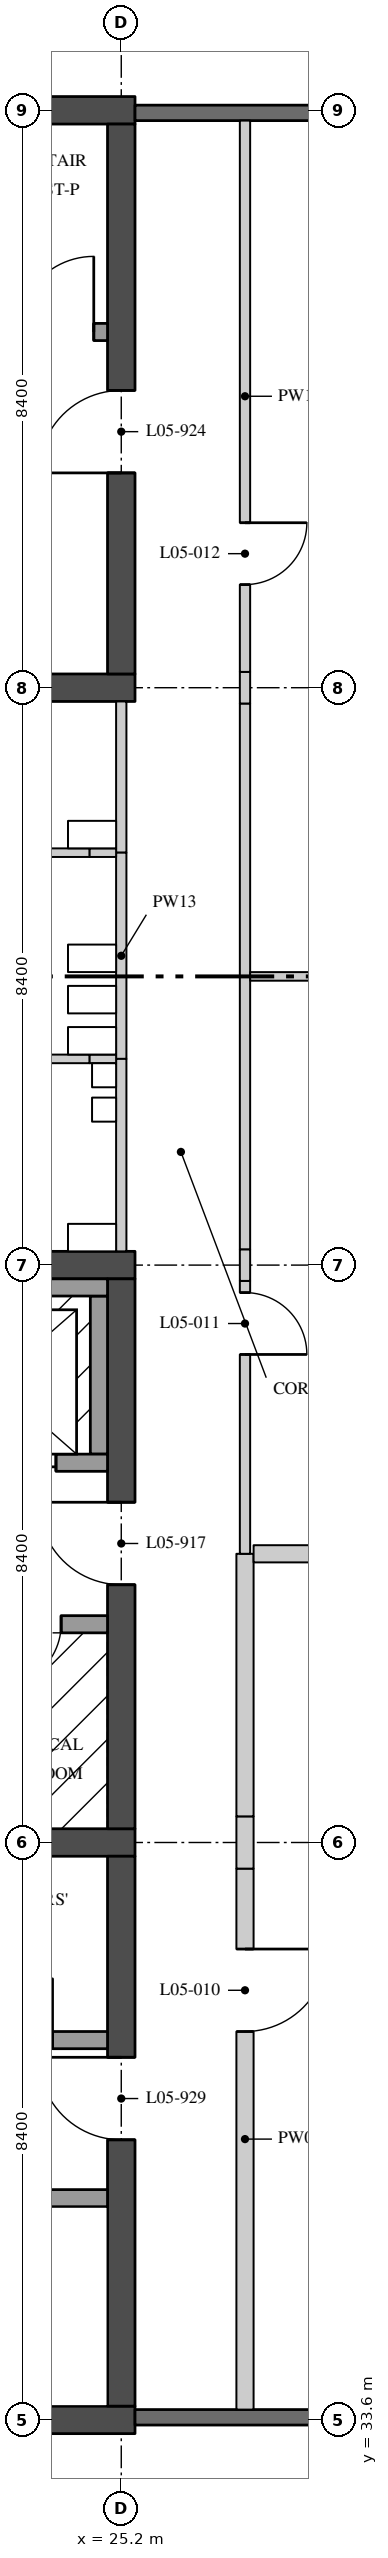
"""IFC4 building model, lengths in metres.
Left out: names, types, materials, properties, quantities, classifications, styles, units other than length and angle.
Written with IfcOpenShell. Run it as: python <this file> out.ifc"""

import sys

from ifc_helpers import new_model, si_unit, direction, frame, frame_2d, origin, place, context, subcontext, project, spatial, rectangle, extrude, element, fill, save


model = new_model("IFC4")
c1 = context("Model", 3, precision=1e-05, world=origin(), true_north=direction((0.0, 1.0)))
c2 = subcontext(c1, "Body", "Model", "MODEL_VIEW")
j1 = project(units=[si_unit("LENGTHUNIT", "METRE"), si_unit("PLANEANGLEUNIT", "RADIAN")], contexts=[c1])
p1 = place(None, origin())
s1 = spatial("IfcSite", under=j1, at=p1, CompositionType="ELEMENT")
p2 = place(p1, origin())
s2 = spatial("IfcBuilding", under=s1, at=p2, CompositionType="ELEMENT")
p3 = place(p2, frame((0.0, 0.0, 23.4)))
s3 = spatial("IfcBuildingStorey", under=s2, at=p3, CompositionType="ELEMENT", Elevation=23.4)
p4 = place(p3, frame((16.6, 42.0, 0.0), z_axis=(0.0, 0.0, 1.0), x_axis=(1.0, 0.0, 0.0)))
e1 = element("IfcWall", 1, at=p4, inside=s3, PredefinedType="SHEAR", context=c2, shape_type="SweptSolid", body=[
    extrude(rectangle(XDim=8.8, YDim=0.4, at=frame_2d((4.4, 0.0))), origin(), (0.0, 0.0, 1.0), 4.37),
])
p5 = place(p4, frame((1.05, 0.0, 0.0)))
e2 = element("IfcOpeningElement", 2, at=p5, cuts=e1, PredefinedType="OPENING", context=c2, shape_type="SweptSolid", body=[
    extrude(rectangle(XDim=1.1, YDim=2.1, at=frame_2d((0.55, 1.05))), frame((0.0, 0.21, 0.0), z_axis=(0.0, -1.0, 0.0), x_axis=(1.0, 0.0, 0.0)), (0.0, 0.0, 1.0), 0.42),
])
p6 = place(p3, frame((16.6, 50.4, 0.0), z_axis=(0.0, 0.0, 1.0), x_axis=(1.0, 0.0, 0.0)))
e3 = element("IfcWall", 3, at=p6, inside=s3, PredefinedType="SHEAR", context=c2, shape_type="SweptSolid", body=[
    extrude(rectangle(XDim=8.8, YDim=0.4, at=frame_2d((4.4, 0.0))), origin(), (0.0, 0.0, 1.0), 4.37),
])
p7 = place(p3, frame((25.2, 42.2, 0.0), z_axis=(0.0, 0.0, 1.0), x_axis=(0.0, 1.0, 0.0)))
e4 = element("IfcWall", 4, at=p7, inside=s3, PredefinedType="SHEAR", context=c2, shape_type="SweptSolid", body=[
    extrude(rectangle(XDim=8.0, YDim=0.4, at=frame_2d((4.0, 0.0))), origin(), (0.0, 0.0, 1.0), 4.37),
])
p8 = place(p7, frame((3.55, 0.0, 0.0)))
e5 = element("IfcOpeningElement", 5, at=p8, cuts=e4, PredefinedType="OPENING", context=c2, shape_type="SweptSolid", body=[
    extrude(rectangle(XDim=1.2, YDim=2.1, at=frame_2d((0.6, 1.05))), frame((0.0, 0.21, 0.0), z_axis=(0.0, -1.0, 0.0), x_axis=(1.0, 0.0, 0.0)), (0.0, 0.0, 1.0), 0.42),
])
p9 = place(p3, frame((25.0, 45.175, 0.0), z_axis=(0.0, 0.0, 1.0), x_axis=(-1.0, 0.0, 0.0)))
e6 = element("IfcWall", 6, at=p9, inside=s3, PredefinedType="SOLIDWALL", context=c2, shape_type="SweptSolid", body=[
    extrude(rectangle(XDim=2.25, YDim=0.25, at=frame_2d((1.125, 0.0))), origin(), (0.0, 0.0, 1.0), 4.37),
])
p10 = place(p9, frame((0.675, 0.0, 0.0)))
e7 = element("IfcOpeningElement", 7, at=p10, cuts=e6, PredefinedType="OPENING", context=c2, shape_type="SweptSolid", body=[
    extrude(rectangle(XDim=0.9, YDim=2.1, at=frame_2d((0.45, 1.05))), frame((0.0, 0.135, 0.0), z_axis=(0.0, -1.0, 0.0), x_axis=(1.0, 0.0, 0.0)), (0.0, 0.0, 1.0), 0.27),
])
for number, where, z_axis, x_axis in (
    (8, (16.6, 58.8, 0.0), (0.0, 0.0, 1.0), (1.0, 0.0, 0.0)),
    (9, (16.6, 67.2, 0.0), (0.0, 0.0, 1.0), (1.0, 0.0, 0.0)),
):
    element("IfcWall", number, at=place(p3, frame(where, z_axis=z_axis, x_axis=x_axis)), inside=s3, PredefinedType="SHEAR", context=c2, shape_type="SweptSolid", body=[
        extrude(rectangle(XDim=8.8, YDim=0.4, at=frame_2d((4.4, 0.0))), origin(), (0.0, 0.0, 1.0), 4.37),
    ])
p11 = place(p3, frame((25.2, 59.0, 0.0), z_axis=(0.0, 0.0, 1.0), x_axis=(0.0, 1.0, 0.0)))
e10 = element("IfcWall", 10, at=p11, inside=s3, PredefinedType="SHEAR", context=c2, shape_type="SweptSolid", body=[
    extrude(rectangle(XDim=8.0, YDim=0.4, at=frame_2d((4.0, 0.0))), origin(), (0.0, 0.0, 1.0), 4.37),
])
p12 = place(p11, frame((2.925, 0.0, 0.0)))
e11 = element("IfcOpeningElement", 11, at=p12, cuts=e10, PredefinedType="OPENING", context=c2, shape_type="SweptSolid", body=[
    extrude(rectangle(XDim=1.2, YDim=2.1, at=frame_2d((0.6, 1.05))), frame((0.0, 0.21, 0.0), z_axis=(0.0, -1.0, 0.0), x_axis=(1.0, 0.0, 0.0)), (0.0, 0.0, 1.0), 0.42),
])
p13 = place(p3, frame((25.0, 63.975, 0.0), z_axis=(0.0, 0.0, 1.0), x_axis=(-1.0, 0.0, 0.0)))
e12 = element("IfcWall", 12, at=p13, inside=s3, PredefinedType="SOLIDWALL", context=c2, shape_type="SweptSolid", body=[
    extrude(rectangle(XDim=8.0, YDim=0.25, at=frame_2d((4.0, 0.0))), origin(), (0.0, 0.0, 1.0), 4.37),
])
p14 = place(p13, frame((0.2, 0.0, 0.0)))
e13 = element("IfcOpeningElement", 13, at=p14, cuts=e12, PredefinedType="OPENING", context=c2, shape_type="SweptSolid", body=[
    extrude(rectangle(XDim=1.1, YDim=2.1, at=frame_2d((0.55, 1.05))), frame((0.0, 0.135, 0.0), z_axis=(0.0, -1.0, 0.0), x_axis=(1.0, 0.0, 0.0)), (0.0, 0.0, 1.0), 0.27),
])
p15 = place(p3, frame((16.6, 33.6, 0.0), z_axis=(0.0, 0.0, 1.0), x_axis=(1.0, 0.0, 0.0)))
e14 = element("IfcWall", 14, at=p15, inside=s3, PredefinedType="SHEAR", context=c2, shape_type="SweptSolid", body=[
    extrude(rectangle(XDim=8.8, YDim=0.4, at=frame_2d((4.4, 0.0))), origin(), (0.0, 0.0, 1.0), 4.37),
])
p16 = place(p3, frame((25.2, 33.8, 0.0), z_axis=(0.0, 0.0, 1.0), x_axis=(0.0, 1.0, 0.0)))
e15 = element("IfcWall", 15, at=p16, inside=s3, PredefinedType="SHEAR", context=c2, shape_type="SweptSolid", body=[
    extrude(rectangle(XDim=8.0, YDim=0.4, at=frame_2d((4.0, 0.0))), origin(), (0.0, 0.0, 1.0), 4.37),
])
p17 = place(p16, frame((3.875, 0.0, 0.0)))
e16 = element("IfcOpeningElement", 16, at=p17, cuts=e15, PredefinedType="OPENING", context=c2, shape_type="SweptSolid", body=[
    extrude(rectangle(XDim=1.2, YDim=2.1, at=frame_2d((0.6, 1.05))), frame((0.0, 0.21, 0.0), z_axis=(0.0, -1.0, 0.0), x_axis=(1.0, 0.0, 0.0)), (0.0, 0.0, 1.0), 0.42),
])
p18 = place(p3, frame((17.0, 36.825, 0.0), z_axis=(0.0, 0.0, 1.0), x_axis=(1.0, 0.0, 0.0)))
e17 = element("IfcWall", 17, at=p18, inside=s3, PredefinedType="SOLIDWALL", context=c2, shape_type="SweptSolid", body=[
    extrude(rectangle(XDim=8.0, YDim=0.25, at=frame_2d((4.0, 0.0))), origin(), (0.0, 0.0, 1.0), 4.37),
])
p19 = place(p18, frame((0.2, 0.0, 0.0)))
e18 = element("IfcOpeningElement", 18, at=p19, cuts=e17, PredefinedType="OPENING", context=c2, shape_type="SweptSolid", body=[
    extrude(rectangle(XDim=1.1, YDim=2.1, at=frame_2d((0.55, 1.05))), frame((0.0, 0.135, 0.0), z_axis=(0.0, -1.0, 0.0), x_axis=(1.0, 0.0, 0.0)), (0.0, 0.0, 1.0), 0.27),
])
p20 = place(p3, frame((19.65, 39.125, 0.0), z_axis=(0.0, 0.0, 1.0), x_axis=(1.0, 0.0, 0.0)))
e19 = element("IfcWall", 19, at=p20, inside=s3, PredefinedType="SOLIDWALL", context=c2, shape_type="SweptSolid", body=[
    extrude(rectangle(XDim=5.35, YDim=0.25, at=frame_2d((2.675, 0.0))), origin(), (0.0, 0.0, 1.0), 4.37),
])
p21 = place(p20, frame((3.65, 0.0, 0.0)))
e20 = element("IfcOpeningElement", 20, at=p21, cuts=e19, PredefinedType="OPENING", context=c2, shape_type="SweptSolid", body=[
    extrude(rectangle(XDim=0.9, YDim=2.1, at=frame_2d((0.45, 1.05))), frame((0.0, 0.135, 0.0), z_axis=(0.0, -1.0, 0.0), x_axis=(1.0, 0.0, 0.0)), (0.0, 0.0, 1.0), 0.27),
])
p22 = place(p20, frame((0.9, 0.0, 0.0)))
e21 = element("IfcOpeningElement", 21, at=p22, cuts=e19, PredefinedType="OPENING", context=c2, shape_type="SweptSolid", body=[
    extrude(rectangle(XDim=0.8, YDim=2.1, at=frame_2d((0.4, 1.05))), frame((0.0, 0.135, 0.0), z_axis=(0.0, -1.0, 0.0), x_axis=(1.0, 0.0, 0.0)), (0.0, 0.0, 1.0), 0.27),
])
p23 = place(p3, frame((24.875, 47.65, 0.0), z_axis=(0.0, 0.0, 1.0), x_axis=(0.0, 1.0, 0.0)))
e22 = element("IfcWall", 22, at=p23, inside=s3, PredefinedType="SOLIDWALL", context=c2, shape_type="SweptSolid", body=[
    extrude(rectangle(XDim=2.3, YDim=0.25, at=frame_2d((1.15, 0.0))), origin(), (0.0, 0.0, 1.0), 4.37),
])
p24 = place(p3, frame((21.7, 50.075, 0.0), z_axis=(0.0, 0.0, 1.0), x_axis=(1.0, 0.0, 0.0)))
e23 = element("IfcWall", 23, at=p24, inside=s3, PredefinedType="SOLIDWALL", context=c2, shape_type="SweptSolid", body=[
    extrude(rectangle(XDim=3.3, YDim=0.25, at=frame_2d((1.65, 0.0))), origin(), (0.0, 0.0, 1.0), 4.37),
])
p25 = place(p3, frame((21.7, 47.525, 0.0), z_axis=(0.0, 0.0, 1.0), x_axis=(1.0, 0.0, 0.0)))
e24 = element("IfcWall", 24, at=p25, inside=s3, PredefinedType="SOLIDWALL", context=c2, shape_type="SweptSolid", body=[
    extrude(rectangle(XDim=3.3, YDim=0.25, at=frame_2d((1.65, 0.0))), origin(), (0.0, 0.0, 1.0), 4.37),
])
p26 = place(p25, frame((0.75, 0.0, 0.0)))
e25 = element("IfcOpeningElement", 25, at=p26, cuts=e24, PredefinedType="OPENING", context=c2, shape_type="SweptSolid", body=[
    extrude(rectangle(XDim=1.8, YDim=2.1, at=frame_2d((0.9, 1.05))), frame((0.0, 0.135, 0.0), z_axis=(0.0, -1.0, 0.0), x_axis=(1.0, 0.0, 0.0)), (0.0, 0.0, 1.0), 0.27),
])
p27 = place(p3, frame((27.0, 33.75, 0.0), z_axis=(0.0, 0.0, 1.0), x_axis=(0.0, 1.0, 0.0)))
e26 = element("IfcWall", 26, at=p27, inside=s3, PredefinedType="PARTITIONING", context=c2, shape_type="SweptSolid", body=[
    extrude(rectangle(XDim=7.87, YDim=0.25, at=frame_2d((3.935, 0.0))), origin(), (0.0, 0.0, 1.0), 4.37),
])
p28 = place(p27, frame((5.5, 0.0, 0.0)))
e27 = element("IfcOpeningElement", 27, at=p28, cuts=e26, PredefinedType="OPENING", context=c2, shape_type="SweptSolid", body=[
    extrude(rectangle(XDim=1.2, YDim=2.4, at=frame_2d((0.6, 1.2))), frame((0.0, 0.135, 0.0), z_axis=(0.0, -1.0, 0.0), x_axis=(1.0, 0.0, 0.0)), (0.0, 0.0, 1.0), 0.27),
])
p29 = place(p3, frame((27.0, 41.62, 0.0), z_axis=(0.0, 0.0, 1.0), x_axis=(0.0, 1.0, 0.0)))
e28 = element("IfcWall", 28, at=p29, inside=s3, PredefinedType="PARTITIONING", context=c2, shape_type="SweptSolid", body=[
    extrude(rectangle(XDim=0.76, YDim=0.25, at=frame_2d((0.38, 0.0))), origin(), (0.0, 0.0, 1.0), 3.817),
])
p30 = place(p3, frame((27.0, 42.38, 0.0), z_axis=(0.0, 0.0, 1.0), x_axis=(0.0, 1.0, 0.0)))
e29 = element("IfcWall", 29, at=p30, inside=s3, PredefinedType="PARTITIONING", context=c2, shape_type="SweptSolid", body=[
    extrude(rectangle(XDim=3.82, YDim=0.25, at=frame_2d((1.91, 0.0))), origin(), (0.0, 0.0, 1.0), 4.37),
])
p31 = place(p3, frame((27.0, 46.2, 0.0), z_axis=(0.0, 0.0, 1.0), x_axis=(0.0, 1.0, 0.0)))
e30 = element("IfcWall", 30, at=p31, inside=s3, PredefinedType="PARTITIONING", context=c2, shape_type="SweptSolid", body=[
    extrude(rectangle(XDim=3.97, YDim=0.15, at=frame_2d((1.985, 0.0))), origin(), (0.0, 0.0, 1.0), 4.37),
])
p32 = place(p31, frame((2.9, 0.0, 0.0)))
e31 = element("IfcOpeningElement", 31, at=p32, cuts=e30, PredefinedType="OPENING", context=c2, shape_type="SweptSolid", body=[
    extrude(rectangle(XDim=0.9, YDim=2.1, at=frame_2d((0.45, 1.05))), frame((0.0, 0.085, 0.0), z_axis=(0.0, -1.0, 0.0), x_axis=(1.0, 0.0, 0.0)), (0.0, 0.0, 1.0), 0.17),
])
p33 = place(p3, frame((27.0, 50.17, 0.0), z_axis=(0.0, 0.0, 1.0), x_axis=(0.0, 1.0, 0.0)))
e32 = element("IfcWall", 32, at=p33, inside=s3, PredefinedType="PARTITIONING", context=c2, shape_type="SweptSolid", body=[
    extrude(rectangle(XDim=0.46, YDim=0.15, at=frame_2d((0.23, 0.0))), origin(), (0.0, 0.0, 1.0), 3.817),
])
p34 = place(p3, frame((27.0, 50.63, 0.0), z_axis=(0.0, 0.0, 1.0), x_axis=(0.0, 1.0, 0.0)))
e33 = element("IfcWall", 33, at=p34, inside=s3, PredefinedType="PARTITIONING", context=c2, shape_type="SweptSolid", body=[
    extrude(rectangle(XDim=3.97, YDim=0.15, at=frame_2d((1.985, 0.0))), origin(), (0.0, 0.0, 1.0), 4.37),
])
p35 = place(p3, frame((27.0, 54.6, 0.0), z_axis=(0.0, 0.0, 1.0), x_axis=(0.0, 1.0, 0.0)))
e34 = element("IfcWall", 34, at=p35, inside=s3, PredefinedType="PARTITIONING", context=c2, shape_type="SweptSolid", body=[
    extrude(rectangle(XDim=3.97, YDim=0.15, at=frame_2d((1.985, 0.0))), origin(), (0.0, 0.0, 1.0), 4.37),
])
p36 = place(p3, frame((27.0, 58.57, 0.0), z_axis=(0.0, 0.0, 1.0), x_axis=(0.0, 1.0, 0.0)))
e35 = element("IfcWall", 35, at=p36, inside=s3, PredefinedType="PARTITIONING", context=c2, shape_type="SweptSolid", body=[
    extrude(rectangle(XDim=0.46, YDim=0.15, at=frame_2d((0.23, 0.0))), origin(), (0.0, 0.0, 1.0), 3.817),
])
p37 = place(p3, frame((27.0, 59.03, 0.0), z_axis=(0.0, 0.0, 1.0), x_axis=(0.0, 1.0, 0.0)))
e36 = element("IfcWall", 36, at=p37, inside=s3, PredefinedType="PARTITIONING", context=c2, shape_type="SweptSolid", body=[
    extrude(rectangle(XDim=8.02, YDim=0.15, at=frame_2d((4.01, 0.0))), origin(), (0.0, 0.0, 1.0), 4.37),
])
p38 = place(p37, frame((1.27, 0.0, 0.0)))
e37 = element("IfcOpeningElement", 37, at=p38, cuts=e36, PredefinedType="OPENING", context=c2, shape_type="SweptSolid", body=[
    extrude(rectangle(XDim=0.9, YDim=2.1, at=frame_2d((0.45, 1.05))), frame((0.0, 0.085, 0.0), z_axis=(0.0, -1.0, 0.0), x_axis=(1.0, 0.0, 0.0)), (0.0, 0.0, 1.0), 0.17),
])
p39 = place(p3, frame((25.2, 56.4, 0.0), z_axis=(0.0, 0.0, 1.0), x_axis=(0.0, 1.0, 0.0)))
e38 = element("IfcWall", 38, at=p39, inside=s3, PredefinedType="PARTITIONING", context=c2, shape_type="SweptSolid", body=[
    extrude(rectangle(XDim=2.2, YDim=0.15, at=frame_2d((1.1, 0.0))), origin(), (0.0, 0.0, 1.0), 3.817),
])
p40 = place(p3, frame((25.2, 53.4, 0.0), z_axis=(0.0, 0.0, 1.0), x_axis=(0.0, 1.0, 0.0)))
e39 = element("IfcWall", 39, at=p40, inside=s3, PredefinedType="PARTITIONING", context=c2, shape_type="SweptSolid", body=[
    extrude(rectangle(XDim=3.0, YDim=0.15, at=frame_2d((1.5, 0.0))), origin(), (0.0, 0.0, 1.0), 3.817),
])
p41 = place(p3, frame((25.2, 50.6, 0.0), z_axis=(0.0, 0.0, 1.0), x_axis=(0.0, 1.0, 0.0)))
e40 = element("IfcWall", 40, at=p41, inside=s3, PredefinedType="PARTITIONING", context=c2, shape_type="SweptSolid", body=[
    extrude(rectangle(XDim=2.8, YDim=0.15, at=frame_2d((1.4, 0.0))), origin(), (0.0, 0.0, 1.0), 3.817),
])
p42 = place(p3, frame((27.125, 46.2, 0.0), z_axis=(0.0, 0.0, 1.0), x_axis=(1.0, 0.0, 0.0)))
e41 = element("IfcWall", 41, at=p42, inside=s3, PredefinedType="PARTITIONING", context=c2, shape_type="SweptSolid", body=[
    extrude(rectangle(XDim=1.255, YDim=0.25, at=frame_2d((0.627, 0.0))), origin(), (0.0, 0.0, 1.0), 3.946),
])
p43 = place(p3, frame((27.075, 54.6, 0.0), z_axis=(0.0, 0.0, 1.0), x_axis=(1.0, 0.0, 0.0)))
e42 = element("IfcWall", 42, at=p43, inside=s3, PredefinedType="PARTITIONING", context=c2, shape_type="SweptSolid", body=[
    extrude(rectangle(XDim=1.117, YDim=0.125, at=frame_2d((0.559, 0.0))), origin(), (0.0, 0.0, 1.0), 3.946),
])
p44 = place(p3, frame((22.592, 56.4, 0.0), z_axis=(0.0, 0.0, 1.0), x_axis=(1.0, 0.0, 0.0)))
e43 = element("IfcWall", 43, at=p44, inside=s3, PredefinedType="PARTITIONING", context=c2, shape_type="SweptSolid", body=[
    extrude(rectangle(XDim=2.148, YDim=0.125, at=frame_2d((1.074, 0.0))), origin(), (0.0, 0.0, 1.0), 4.37),
])
p45 = place(p3, frame((24.74, 56.4, 0.0), z_axis=(0.0, 0.0, 1.0), x_axis=(1.0, 0.0, 0.0)))
e44 = element("IfcWall", 44, at=p45, inside=s3, PredefinedType="PARTITIONING", context=c2, shape_type="SweptSolid", body=[
    extrude(rectangle(XDim=0.385, YDim=0.125, at=frame_2d((0.192, 0.0))), origin(), (0.0, 0.0, 1.0), 3.817),
])
p46 = place(p3, frame((22.592, 53.4, 0.0), z_axis=(0.0, 0.0, 1.0), x_axis=(1.0, 0.0, 0.0)))
e45 = element("IfcWall", 45, at=p46, inside=s3, PredefinedType="PARTITIONING", context=c2, shape_type="SweptSolid", body=[
    extrude(rectangle(XDim=2.148, YDim=0.125, at=frame_2d((1.074, 0.0))), origin(), (0.0, 0.0, 1.0), 4.37),
])
p47 = place(p3, frame((24.74, 53.4, 0.0), z_axis=(0.0, 0.0, 1.0), x_axis=(1.0, 0.0, 0.0)))
e46 = element("IfcWall", 46, at=p47, inside=s3, PredefinedType="PARTITIONING", context=c2, shape_type="SweptSolid", body=[
    extrude(rectangle(XDim=0.385, YDim=0.125, at=frame_2d((0.192, 0.0))), origin(), (0.0, 0.0, 1.0), 3.817),
])
p48 = place(p3, frame((25.4, 33.637, 0.0), z_axis=(0.0, 0.0, 1.0), x_axis=(1.0, 0.0, 0.0)))
e47 = element("IfcWall", 47, at=p48, inside=s3, PredefinedType="SOLIDWALL", context=c2, shape_type="SweptSolid", body=[
    extrude(rectangle(XDim=8.196, YDim=0.225, at=frame_2d((4.098, 0.0))), origin(), (0.0, 0.0, 1.0), 3.819),
])
p49 = place(p48, frame((5.5, 0.0, 0.6)))
e48 = element("IfcOpeningElement", 48, at=p49, cuts=e47, PredefinedType="OPENING", context=c2, shape_type="SweptSolid", body=[
    extrude(rectangle(XDim=1.2, YDim=2.1, at=frame_2d((0.6, 1.05))), frame((0.0, 0.123, 0.0), z_axis=(0.0, -1.0, 0.0), x_axis=(1.0, 0.0, 0.0)), (0.0, 0.0, 1.0), 0.245),
])
p50 = place(p3, frame((33.594, 67.163, 0.0), z_axis=(0.0, 0.0, 1.0), x_axis=(-1.0, 0.0, 0.0)))
e49 = element("IfcWall", 49, at=p50, inside=s3, PredefinedType="SOLIDWALL", context=c2, shape_type="SweptSolid", body=[
    extrude(rectangle(XDim=8.195, YDim=0.225, at=frame_2d((4.097, 0.0))), origin(), (0.0, 0.0, 1.0), 3.819),
])
p51 = place(p50, frame((1.495, 0.0, 0.6)))
e50 = element("IfcOpeningElement", 50, at=p51, cuts=e49, PredefinedType="OPENING", context=c2, shape_type="SweptSolid", body=[
    extrude(rectangle(XDim=1.2, YDim=2.1, at=frame_2d((0.6, 1.05))), frame((0.0, 0.123, 0.0), z_axis=(0.0, -1.0, 0.0), x_axis=(1.0, 0.0, 0.0)), (0.0, 0.0, 1.0), 0.245),
])
p52 = place(p8, origin())
e51 = element("IfcDoor", 51, at=p52, inside=s3, OperationType="SINGLE_SWING_LEFT", PredefinedType="DOOR", context=c2, shape_type="SweptSolid", body=[
    extrude(rectangle(XDim=1.2, YDim=2.1, at=frame_2d((0.6, 1.05))), frame((0.0, 0.035, 0.0), z_axis=(0.0, -1.0, 0.0), x_axis=(1.0, 0.0, 0.0)), (0.0, 0.0, 1.0), 0.07),
])
fill(e5, e51)
p53 = place(p10, origin())
e52 = element("IfcDoor", 52, at=p53, inside=s3, OperationType="SINGLE_SWING_LEFT", PredefinedType="DOOR", context=c2, shape_type="SweptSolid", body=[
    extrude(rectangle(XDim=0.9, YDim=2.1, at=frame_2d((0.45, 1.05))), frame((0.0, 0.05, 0.0), z_axis=(0.0, -1.0, 0.0), x_axis=(1.0, 0.0, 0.0)), (0.0, 0.0, 1.0), 0.1),
])
fill(e7, e52)
p54 = place(p12, origin())
e53 = element("IfcDoor", 53, at=p54, inside=s3, OperationType="SINGLE_SWING_RIGHT", PredefinedType="DOOR", context=c2, shape_type="SweptSolid", body=[
    extrude(rectangle(XDim=1.2, YDim=2.1, at=frame_2d((0.6, 1.05))), frame((0.0, 0.035, 0.0), z_axis=(0.0, -1.0, 0.0), x_axis=(1.0, 0.0, 0.0)), (0.0, 0.0, 1.0), 0.07),
])
fill(e11, e53)
p55 = place(p14, frame((1.1, 0.0, 0.0), z_axis=(0.0, 0.0, 1.0), x_axis=(-1.0, 0.0, 0.0)))
e54 = element("IfcDoor", 54, at=p55, inside=s3, OperationType="SINGLE_SWING_LEFT", PredefinedType="DOOR", context=c2, shape_type="SweptSolid", body=[
    extrude(rectangle(XDim=1.1, YDim=2.1, at=frame_2d((0.55, 1.05))), frame((0.0, 0.035, 0.0), z_axis=(0.0, -1.0, 0.0), x_axis=(1.0, 0.0, 0.0)), (0.0, 0.0, 1.0), 0.07),
])
fill(e13, e54)
p56 = place(p17, origin())
e55 = element("IfcDoor", 55, at=p56, inside=s3, OperationType="SINGLE_SWING_LEFT", PredefinedType="DOOR", context=c2, shape_type="SweptSolid", body=[
    extrude(rectangle(XDim=1.2, YDim=2.1, at=frame_2d((0.6, 1.05))), frame((0.0, 0.035, 0.0), z_axis=(0.0, -1.0, 0.0), x_axis=(1.0, 0.0, 0.0)), (0.0, 0.0, 1.0), 0.07),
])
fill(e16, e55)
p57 = place(p26, origin())
e56 = element("IfcDoor", 56, at=p57, inside=s3, OperationType="DOUBLE_DOOR_SLIDING", PredefinedType="DOOR", context=c2, shape_type="SweptSolid", body=[
    extrude(rectangle(XDim=1.8, YDim=2.1, at=frame_2d((0.9, 1.05))), frame((0.0, 0.04, 0.0), z_axis=(0.0, -1.0, 0.0), x_axis=(1.0, 0.0, 0.0)), (0.0, 0.0, 1.0), 0.08),
])
fill(e25, e56)
p58 = place(p28, frame((1.2, 0.0, 0.0), z_axis=(0.0, 0.0, 1.0), x_axis=(-1.0, 0.0, 0.0)))
e57 = element("IfcDoor", 57, at=p58, inside=s3, OperationType="SINGLE_SWING_RIGHT", PredefinedType="DOOR", context=c2, shape_type="SweptSolid", body=[
    extrude(rectangle(XDim=1.2, YDim=2.4, at=frame_2d((0.6, 1.2))), frame((0.0, 0.05, 0.0), z_axis=(0.0, -1.0, 0.0), x_axis=(1.0, 0.0, 0.0)), (0.0, 0.0, 1.0), 0.1),
])
fill(e27, e57)
p59 = place(p32, frame((0.9, 0.0, 0.0), z_axis=(0.0, 0.0, 1.0), x_axis=(-1.0, 0.0, 0.0)))
e58 = element("IfcDoor", 58, at=p59, inside=s3, OperationType="SINGLE_SWING_LEFT", PredefinedType="DOOR", context=c2, shape_type="SweptSolid", body=[
    extrude(rectangle(XDim=0.9, YDim=2.1, at=frame_2d((0.45, 1.05))), frame((0.0, 0.025, 0.0), z_axis=(0.0, -1.0, 0.0), x_axis=(1.0, 0.0, 0.0)), (0.0, 0.0, 1.0), 0.05),
])
fill(e31, e58)
p60 = place(p38, frame((0.9, 0.0, 0.0), z_axis=(0.0, 0.0, 1.0), x_axis=(-1.0, 0.0, 0.0)))
e59 = element("IfcDoor", 59, at=p60, inside=s3, OperationType="SINGLE_SWING_RIGHT", PredefinedType="DOOR", context=c2, shape_type="SweptSolid", body=[
    extrude(rectangle(XDim=0.9, YDim=2.1, at=frame_2d((0.45, 1.05))), frame((0.0, 0.025, 0.0), z_axis=(0.0, -1.0, 0.0), x_axis=(1.0, 0.0, 0.0)), (0.0, 0.0, 1.0), 0.05),
])
fill(e37, e59)
save(model, sys.argv[1])
